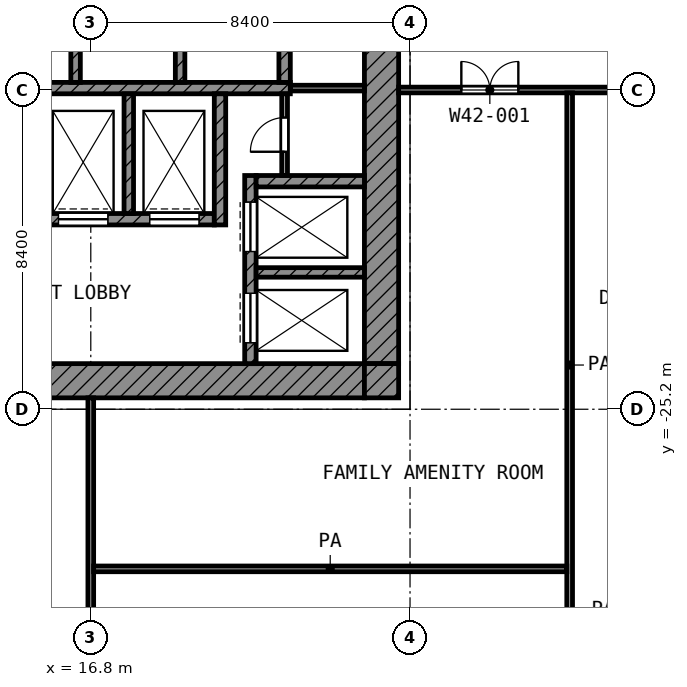
"""IFC4 building model, lengths in metres.
Left out: names, types, materials, properties, quantities, classifications, styles, units other than length and angle.
Written with IfcOpenShell. Run it as: python <this file> out.ifc"""

import sys

from ifc_helpers import new_model, si_unit, direction, frame, frame_2d, origin, place, context, subcontext, project, spatial, rectangle, extrude, element, fill, save


model = new_model("IFC4")
c1 = context("Model", 3, precision=1e-05, world=origin(), true_north=direction((0.0, 1.0)))
c2 = subcontext(c1, "Body", "Model", "MODEL_VIEW")
j1 = project(units=[si_unit("LENGTHUNIT", "METRE"), si_unit("PLANEANGLEUNIT", "RADIAN")], contexts=[c1])
p1 = place(None, origin())
s1 = spatial("IfcSite", under=j1, at=p1, CompositionType="ELEMENT")
p2 = place(p1, origin())
s2 = spatial("IfcBuilding", under=s1, at=p2, CompositionType="ELEMENT")
p3 = place(p2, frame((0.0, 0.0, 183.6)))
s3 = spatial("IfcBuildingStorey", under=s2, at=p3, CompositionType="ELEMENT", Elevation=183.6)
p4 = place(p3, frame((24.45, -24.0, 0.0), z_axis=(0.0, 0.0, 1.0), x_axis=(0.0, 1.0, 0.0)))
e1 = element("IfcWall", 1, at=p4, inside=s3, PredefinedType="SHEAR", context=c2, shape_type="SweptSolid", body=[
    extrude(rectangle(XDim=18.6, YDim=0.9, at=frame_2d((9.3, 0.0))), origin(), (0.0, 0.0, 1.0), 3.6),
])
p5 = place(p4, frame((10.5, 0.0, 0.0)))
e2 = element("IfcOpeningElement", 2, at=p5, cuts=e1, PredefinedType="OPENING", context=c2, shape_type="SweptSolid", body=[
    extrude(rectangle(XDim=1.8, YDim=2.1, at=frame_2d((0.9, 1.05))), frame((0.0, 0.46, 0.0), z_axis=(0.0, -1.0, 0.0), x_axis=(1.0, 0.0, 0.0)), (0.0, 0.0, 1.0), 0.92),
])
p6 = place(p3, frame((5.4, -24.45, 0.0), z_axis=(0.0, 0.0, 1.0), x_axis=(1.0, 0.0, 0.0)))
e3 = element("IfcWall", 3, at=p6, inside=s3, PredefinedType="SHEAR", context=c2, shape_type="SweptSolid", body=[
    extrude(rectangle(XDim=18.6, YDim=0.9, at=frame_2d((9.3, 0.0))), origin(), (0.0, 0.0, 1.0), 3.6),
])
p7 = place(p6, frame((6.3, 0.0, 0.0)))
e4 = element("IfcOpeningElement", 4, at=p7, cuts=e3, PredefinedType="OPENING", context=c2, shape_type="SweptSolid", body=[
    extrude(rectangle(XDim=1.8, YDim=2.1, at=frame_2d((0.9, 1.05))), frame((0.0, 0.46, 0.0), z_axis=(0.0, -1.0, 0.0), x_axis=(1.0, 0.0, 0.0)), (0.0, 0.0, 1.0), 0.92),
])
p8 = place(p3, frame((24.45, -24.9, 0.0), z_axis=(0.0, 0.0, 1.0), x_axis=(0.0, 1.0, 0.0)))
e5 = element("IfcWall", 5, at=p8, inside=s3, PredefinedType="SHEAR", context=c2, shape_type="SweptSolid", body=[
    extrude(rectangle(XDim=0.9, YDim=0.9, at=frame_2d((0.45, 0.0))), origin(), (0.0, 0.0, 1.0), 3.6),
])
p9 = place(p3, frame((5.4, -16.75, 0.0), z_axis=(0.0, 0.0, 1.0), x_axis=(1.0, 0.0, 0.0)))
e6 = element("IfcWall", 6, at=p9, inside=s3, PredefinedType="SHEAR", context=c2, shape_type="SweptSolid", body=[
    extrude(rectangle(XDim=16.65, YDim=0.3, at=frame_2d((8.325, 0.0))), origin(), (0.0, 0.0, 1.0), 3.6),
])
p10 = place(p3, frame((5.4, -20.2, 0.0), z_axis=(0.0, 0.0, 1.0), x_axis=(1.0, 0.0, 0.0)))
e7 = element("IfcWall", 7, at=p10, inside=s3, PredefinedType="SHEAR", context=c2, shape_type="SweptSolid", body=[
    extrude(rectangle(XDim=14.65, YDim=0.3, at=frame_2d((7.325, 0.0))), origin(), (0.0, 0.0, 1.0), 3.6),
])
p11 = place(p10, frame((10.55, 0.0, 0.0)))
e8 = element("IfcOpeningElement", 8, at=p11, cuts=e7, PredefinedType="OPENING", context=c2, shape_type="SweptSolid", body=[
    extrude(rectangle(XDim=1.3, YDim=2.1, at=frame_2d((0.65, 1.05))), frame((0.0, 0.16, 0.0), z_axis=(0.0, -1.0, 0.0), x_axis=(1.0, 0.0, 0.0)), (0.0, 0.0, 1.0), 0.32),
])
p12 = place(p10, frame((12.95, 0.0, 0.0)))
e9 = element("IfcOpeningElement", 9, at=p12, cuts=e7, PredefinedType="OPENING", context=c2, shape_type="SweptSolid", body=[
    extrude(rectangle(XDim=1.3, YDim=2.1, at=frame_2d((0.65, 1.05))), frame((0.0, 0.16, 0.0), z_axis=(0.0, -1.0, 0.0), x_axis=(1.0, 0.0, 0.0)), (0.0, 0.0, 1.0), 0.32),
])
p13 = place(p10, frame((0.55, 0.0, 0.0)))
e10 = element("IfcOpeningElement", 10, at=p13, cuts=e7, PredefinedType="OPENING", context=c2, shape_type="SweptSolid", body=[
    extrude(rectangle(XDim=1.3, YDim=2.1, at=frame_2d((0.65, 1.05))), frame((0.0, 0.16, 0.0), z_axis=(0.0, -1.0, 0.0), x_axis=(1.0, 0.0, 0.0)), (0.0, 0.0, 1.0), 0.32),
])
p14 = place(p10, frame((2.95, 0.0, 0.0)))
e11 = element("IfcOpeningElement", 11, at=p14, cuts=e7, PredefinedType="OPENING", context=c2, shape_type="SweptSolid", body=[
    extrude(rectangle(XDim=1.3, YDim=2.1, at=frame_2d((0.65, 1.05))), frame((0.0, 0.16, 0.0), z_axis=(0.0, -1.0, 0.0), x_axis=(1.0, 0.0, 0.0)), (0.0, 0.0, 1.0), 0.32),
])
p15 = place(p10, frame((7.15, 0.0, 0.0)))
e12 = element("IfcOpeningElement", 12, at=p15, cuts=e7, PredefinedType="OPENING", context=c2, shape_type="SweptSolid", body=[
    extrude(rectangle(XDim=0.9, YDim=2.1, at=frame_2d((0.45, 1.05))), frame((0.0, 0.16, 0.0), z_axis=(0.0, -1.0, 0.0), x_axis=(1.0, 0.0, 0.0)), (0.0, 0.0, 1.0), 0.32),
])
p16 = place(p3, frame((20.2, -20.35, 0.0), z_axis=(0.0, 0.0, 1.0), x_axis=(0.0, 1.0, 0.0)))
e13 = element("IfcWall", 13, at=p16, inside=s3, PredefinedType="SHEAR", context=c2, shape_type="SweptSolid", body=[
    extrude(rectangle(XDim=3.45, YDim=0.3, at=frame_2d((1.725, 0.0))), origin(), (0.0, 0.0, 1.0), 3.6),
])
p17 = place(p3, frame((21.9, -16.6, 0.0), z_axis=(0.0, 0.0, 1.0), x_axis=(0.0, 1.0, 0.0)))
e14 = element("IfcWall", 14, at=p17, inside=s3, PredefinedType="SHEAR", context=c2, shape_type="SweptSolid", body=[
    extrude(rectangle(XDim=2.35, YDim=0.3, at=frame_2d((1.175, 0.0))), origin(), (0.0, 0.0, 1.0), 3.6),
])
p18 = place(p3, frame((21.15, -19.2, 0.0), z_axis=(0.0, 0.0, 1.0), x_axis=(1.0, 0.0, 0.0)))
e15 = element("IfcWall", 15, at=p18, inside=s3, PredefinedType="SHEAR", context=c2, shape_type="SweptSolid", body=[
    extrude(rectangle(XDim=2.85, YDim=0.3, at=frame_2d((1.425, 0.0))), origin(), (0.0, 0.0, 1.0), 3.6),
])
p19 = place(p3, frame((21.0, -24.0, 0.0), z_axis=(0.0, 0.0, 1.0), x_axis=(0.0, 1.0, 0.0)))
e16 = element("IfcWall", 16, at=p19, inside=s3, PredefinedType="SHEAR", context=c2, shape_type="SweptSolid", body=[
    extrude(rectangle(XDim=4.95, YDim=0.3, at=frame_2d((2.475, 0.0))), origin(), (0.0, 0.0, 1.0), 3.6),
])
p20 = place(p19, frame((2.95, 0.0, 0.0)))
e17 = element("IfcOpeningElement", 17, at=p20, cuts=e16, PredefinedType="OPENING", context=c2, shape_type="SweptSolid", body=[
    extrude(rectangle(XDim=1.3, YDim=2.1, at=frame_2d((0.65, 1.05))), frame((0.0, 0.16, 0.0), z_axis=(0.0, -1.0, 0.0), x_axis=(1.0, 0.0, 0.0)), (0.0, 0.0, 1.0), 0.32),
])
p21 = place(p19, frame((0.55, 0.0, 0.0)))
e18 = element("IfcOpeningElement", 18, at=p21, cuts=e16, PredefinedType="OPENING", context=c2, shape_type="SweptSolid", body=[
    extrude(rectangle(XDim=1.3, YDim=2.1, at=frame_2d((0.65, 1.05))), frame((0.0, 0.16, 0.0), z_axis=(0.0, -1.0, 0.0), x_axis=(1.0, 0.0, 0.0)), (0.0, 0.0, 1.0), 0.32),
])
p22 = place(p3, frame((21.15, -21.6, 0.0), z_axis=(0.0, 0.0, 1.0), x_axis=(1.0, 0.0, 0.0)))
e19 = element("IfcWall", 19, at=p22, inside=s3, PredefinedType="SHEAR", context=c2, shape_type="SweptSolid", body=[
    extrude(rectangle(XDim=2.85, YDim=0.25, at=frame_2d((1.425, 0.0))), origin(), (0.0, 0.0, 1.0), 3.6),
])
p23 = place(p3, frame((17.8, -20.05, 0.0), z_axis=(0.0, 0.0, 1.0), x_axis=(0.0, 1.0, 0.0)))
e20 = element("IfcWall", 20, at=p23, inside=s3, PredefinedType="SHEAR", context=c2, shape_type="SweptSolid", body=[
    extrude(rectangle(XDim=3.15, YDim=0.25, at=frame_2d((1.575, 0.0))), origin(), (0.0, 0.0, 1.0), 3.6),
])
for number, where, z_axis, x_axis in (
    (21, (16.4, -16.6, 0.0), (0.0, 0.0, 1.0), (0.0, 1.0, 0.0)),
    (22, (19.15, -16.6, 0.0), (0.0, 0.0, 1.0), (0.0, 1.0, 0.0)),
):
    element("IfcWall", number, at=place(p3, frame(where, z_axis=z_axis, x_axis=x_axis)), inside=s3, PredefinedType="SHEAR", context=c2, shape_type="SweptSolid", body=[
        extrude(rectangle(XDim=2.35, YDim=0.25, at=frame_2d((1.175, 0.0))), origin(), (0.0, 0.0, 1.0), 3.6),
    ])
p24 = place(p3, frame((21.9, -19.05, 0.0), z_axis=(0.0, 0.0, 1.0), x_axis=(0.0, 1.0, 0.0)))
e23 = element("IfcWall", 23, at=p24, inside=s3, PredefinedType="PARTITIONING", context=c2, shape_type="SweptSolid", body=[
    extrude(rectangle(XDim=2.15, YDim=0.15, at=frame_2d((1.075, 0.0))), origin(), (0.0, 0.0, 1.0), 3.6),
])
p25 = place(p24, frame((0.625, 0.0, 0.0)))
e24 = element("IfcOpeningElement", 24, at=p25, cuts=e23, PredefinedType="OPENING", context=c2, shape_type="SweptSolid", body=[
    extrude(rectangle(XDim=0.9, YDim=2.1, at=frame_2d((0.45, 1.05))), frame((0.0, 0.085, 0.0), z_axis=(0.0, -1.0, 0.0), x_axis=(1.0, 0.0, 0.0)), (0.0, 0.0, 1.0), 0.17),
])
p26 = place(p3, frame((22.05, -16.75, 0.0), z_axis=(0.0, 0.0, 1.0), x_axis=(1.0, 0.0, 0.0)))
e25 = element("IfcWall", 25, at=p26, inside=s3, PredefinedType="PARTITIONING", context=c2, shape_type="SweptSolid", body=[
    extrude(rectangle(XDim=1.95, YDim=0.15, at=frame_2d((0.975, 0.0))), origin(), (0.0, 0.0, 1.0), 3.6),
])
p27 = place(p3, frame((16.875, -29.4, 0.0), z_axis=(0.0, 0.0, 1.0), x_axis=(1.0, 0.0, 0.0)))
e26 = element("IfcWall", 26, at=p27, inside=s3, PredefinedType="PARTITIONING", context=c2, shape_type="SweptSolid", body=[
    extrude(rectangle(XDim=12.45, YDim=0.15, at=frame_2d((6.225, 0.0))), origin(), (0.0, 0.0, 1.0), 3.6),
])
p28 = place(p3, frame((24.9, -16.8, 0.0), z_axis=(0.0, 0.0, 1.0), x_axis=(1.0, 0.0, 0.0)))
e27 = element("IfcWall", 27, at=p28, inside=s3, PredefinedType="PARTITIONING", context=c2, shape_type="SweptSolid", body=[
    extrude(rectangle(XDim=42.22, YDim=0.15, at=frame_2d((21.11, 0.0))), origin(), (0.0, 0.0, 1.0), 3.6),
])
p29 = place(p28, frame((1.65, 0.0, 0.0)))
e28 = element("IfcOpeningElement", 28, at=p29, cuts=e27, PredefinedType="OPENING", context=c2, shape_type="SweptSolid", body=[
    extrude(rectangle(XDim=1.5, YDim=2.1, at=frame_2d((0.75, 1.05))), frame((0.0, 0.085, 0.0), z_axis=(0.0, -1.0, 0.0), x_axis=(1.0, 0.0, 0.0)), (0.0, 0.0, 1.0), 0.17),
])
p30 = place(p28, frame((6.1, 0.0, 0.0)))
e29 = element("IfcOpeningElement", 29, at=p30, cuts=e27, PredefinedType="OPENING", context=c2, shape_type="SweptSolid", body=[
    extrude(rectangle(XDim=1.0, YDim=2.1, at=frame_2d((0.5, 1.05))), frame((0.0, 0.085, 0.0), z_axis=(0.0, -1.0, 0.0), x_axis=(1.0, 0.0, 0.0)), (0.0, 0.0, 1.0), 0.17),
])
p31 = place(p28, frame((10.2, 0.0, 0.0)))
e30 = element("IfcOpeningElement", 30, at=p31, cuts=e27, PredefinedType="OPENING", context=c2, shape_type="SweptSolid", body=[
    extrude(rectangle(XDim=1.2, YDim=2.1, at=frame_2d((0.6, 1.05))), frame((0.0, 0.085, 0.0), z_axis=(0.0, -1.0, 0.0), x_axis=(1.0, 0.0, 0.0)), (0.0, 0.0, 1.0), 0.17),
])
p32 = place(p28, frame((20.34, 0.0, 0.0)))
e31 = element("IfcOpeningElement", 31, at=p32, cuts=e27, PredefinedType="OPENING", context=c2, shape_type="SweptSolid", body=[
    extrude(rectangle(XDim=1.2, YDim=2.1, at=frame_2d((0.6, 1.05))), frame((0.0, 0.085, 0.0), z_axis=(0.0, -1.0, 0.0), x_axis=(1.0, 0.0, 0.0)), (0.0, 0.0, 1.0), 0.17),
])
p33 = place(p28, frame((18.78, 0.0, 0.0)))
e32 = element("IfcOpeningElement", 32, at=p33, cuts=e27, PredefinedType="OPENING", context=c2, shape_type="SweptSolid", body=[
    extrude(rectangle(XDim=1.2, YDim=2.1, at=frame_2d((0.6, 1.05))), frame((0.0, 0.085, 0.0), z_axis=(0.0, -1.0, 0.0), x_axis=(1.0, 0.0, 0.0)), (0.0, 0.0, 1.0), 0.17),
])
p34 = place(p28, frame((28.0, 0.0, 0.0)))
e33 = element("IfcOpeningElement", 33, at=p34, cuts=e27, PredefinedType="OPENING", context=c2, shape_type="SweptSolid", body=[
    extrude(rectangle(XDim=1.2, YDim=2.1, at=frame_2d((0.6, 1.05))), frame((0.0, 0.085, 0.0), z_axis=(0.0, -1.0, 0.0), x_axis=(1.0, 0.0, 0.0)), (0.0, 0.0, 1.0), 0.17),
])
p35 = place(p28, frame((26.48, 0.0, 0.0)))
e34 = element("IfcOpeningElement", 34, at=p35, cuts=e27, PredefinedType="OPENING", context=c2, shape_type="SweptSolid", body=[
    extrude(rectangle(XDim=1.2, YDim=2.1, at=frame_2d((0.6, 1.05))), frame((0.0, 0.085, 0.0), z_axis=(0.0, -1.0, 0.0), x_axis=(1.0, 0.0, 0.0)), (0.0, 0.0, 1.0), 0.17),
])
p36 = place(p28, frame((32.1, 0.0, 0.0)))
e35 = element("IfcOpeningElement", 35, at=p36, cuts=e27, PredefinedType="OPENING", context=c2, shape_type="SweptSolid", body=[
    extrude(rectangle(XDim=1.2, YDim=2.1, at=frame_2d((0.6, 1.05))), frame((0.0, 0.085, 0.0), z_axis=(0.0, -1.0, 0.0), x_axis=(1.0, 0.0, 0.0)), (0.0, 0.0, 1.0), 0.17),
])
p37 = place(p28, frame((37.35, 0.0, 0.0)))
e36 = element("IfcOpeningElement", 36, at=p37, cuts=e27, PredefinedType="OPENING", context=c2, shape_type="SweptSolid", body=[
    extrude(rectangle(XDim=1.5, YDim=2.1, at=frame_2d((0.75, 1.05))), frame((0.0, 0.085, 0.0), z_axis=(0.0, -1.0, 0.0), x_axis=(1.0, 0.0, 0.0)), (0.0, 0.0, 1.0), 0.17),
])
p38 = place(p3, frame((16.8, -54.52, 0.0), z_axis=(0.0, 0.0, 1.0), x_axis=(0.0, 1.0, 0.0)))
e37 = element("IfcWall", 37, at=p38, inside=s3, PredefinedType="PARTITIONING", context=c2, shape_type="SweptSolid", body=[
    extrude(rectangle(XDim=29.62, YDim=0.15, at=frame_2d((14.81, 0.0))), origin(), (0.0, 0.0, 1.0), 3.6),
])
p39 = place(p38, frame((21.52, 0.0, 0.0)))
e38 = element("IfcOpeningElement", 38, at=p39, cuts=e37, PredefinedType="OPENING", context=c2, shape_type="SweptSolid", body=[
    extrude(rectangle(XDim=1.2, YDim=2.1, at=frame_2d((0.6, 1.05))), frame((0.0, 0.085, 0.0), z_axis=(0.0, -1.0, 0.0), x_axis=(1.0, 0.0, 0.0)), (0.0, 0.0, 1.0), 0.17),
])
p40 = place(p38, frame((10.76, 0.0, 0.0)))
e39 = element("IfcOpeningElement", 39, at=p40, cuts=e37, PredefinedType="OPENING", context=c2, shape_type="SweptSolid", body=[
    extrude(rectangle(XDim=1.2, YDim=2.1, at=frame_2d((0.6, 1.05))), frame((0.0, 0.085, 0.0), z_axis=(0.0, -1.0, 0.0), x_axis=(1.0, 0.0, 0.0)), (0.0, 0.0, 1.0), 0.17),
])
p41 = place(p38, frame((9.2, 0.0, 0.0)))
e40 = element("IfcOpeningElement", 40, at=p41, cuts=e37, PredefinedType="OPENING", context=c2, shape_type="SweptSolid", body=[
    extrude(rectangle(XDim=1.2, YDim=2.1, at=frame_2d((0.6, 1.05))), frame((0.0, 0.085, 0.0), z_axis=(0.0, -1.0, 0.0), x_axis=(1.0, 0.0, 0.0)), (0.0, 0.0, 1.0), 0.17),
])
p42 = place(p38, frame((7.99, 0.0, 0.0)))
e41 = element("IfcOpeningElement", 41, at=p42, cuts=e37, PredefinedType="OPENING", context=c2, shape_type="SweptSolid", body=[
    extrude(rectangle(XDim=0.9, YDim=2.1, at=frame_2d((0.45, 1.05))), frame((0.0, 0.085, 0.0), z_axis=(0.0, -1.0, 0.0), x_axis=(1.0, 0.0, 0.0)), (0.0, 0.0, 1.0), 0.17),
])
p43 = place(p38, frame((2.07, 0.0, 0.0)))
e42 = element("IfcOpeningElement", 42, at=p43, cuts=e37, PredefinedType="OPENING", context=c2, shape_type="SweptSolid", body=[
    extrude(rectangle(XDim=1.5, YDim=2.1, at=frame_2d((0.75, 1.05))), frame((0.0, 0.085, 0.0), z_axis=(0.0, -1.0, 0.0), x_axis=(1.0, 0.0, 0.0)), (0.0, 0.0, 1.0), 0.17),
])
p44 = place(p3, frame((29.4, -31.198, 0.0), z_axis=(0.0, 0.0, 1.0), x_axis=(0.0, 1.0, 0.0)))
e43 = element("IfcWall", 43, at=p44, inside=s3, PredefinedType="PARTITIONING", context=c2, shape_type="SweptSolid", body=[
    extrude(rectangle(XDim=14.323, YDim=0.15, at=frame_2d((7.162, 0.0))), origin(), (0.0, 0.0, 1.0), 3.6),
])
p45 = place(p20, origin())
e44 = element("IfcDoor", 44, at=p45, inside=s3, OperationType="DOUBLE_DOOR_SLIDING", PredefinedType="DOOR", context=c2, shape_type="SweptSolid", body=[
    extrude(rectangle(XDim=1.3, YDim=2.1, at=frame_2d((0.65, 1.05))), frame((0.0, 0.025, 0.0), z_axis=(0.0, -1.0, 0.0), x_axis=(1.0, 0.0, 0.0)), (0.0, 0.0, 1.0), 0.05),
])
fill(e17, e44)
p46 = place(p21, origin())
e45 = element("IfcDoor", 45, at=p46, inside=s3, OperationType="DOUBLE_DOOR_SLIDING", PredefinedType="DOOR", context=c2, shape_type="SweptSolid", body=[
    extrude(rectangle(XDim=1.3, YDim=2.1, at=frame_2d((0.65, 1.05))), frame((0.0, 0.025, 0.0), z_axis=(0.0, -1.0, 0.0), x_axis=(1.0, 0.0, 0.0)), (0.0, 0.0, 1.0), 0.05),
])
fill(e18, e45)
p47 = place(p11, origin())
e46 = element("IfcDoor", 46, at=p47, inside=s3, OperationType="DOUBLE_DOOR_SLIDING", PredefinedType="DOOR", context=c2, shape_type="SweptSolid", body=[
    extrude(rectangle(XDim=1.3, YDim=2.1, at=frame_2d((0.65, 1.05))), frame((0.0, 0.025, 0.0), z_axis=(0.0, -1.0, 0.0), x_axis=(1.0, 0.0, 0.0)), (0.0, 0.0, 1.0), 0.05),
])
fill(e8, e46)
p48 = place(p12, origin())
e47 = element("IfcDoor", 47, at=p48, inside=s3, OperationType="DOUBLE_DOOR_SLIDING", PredefinedType="DOOR", context=c2, shape_type="SweptSolid", body=[
    extrude(rectangle(XDim=1.3, YDim=2.1, at=frame_2d((0.65, 1.05))), frame((0.0, 0.025, 0.0), z_axis=(0.0, -1.0, 0.0), x_axis=(1.0, 0.0, 0.0)), (0.0, 0.0, 1.0), 0.05),
])
fill(e9, e47)
p49 = place(p25, origin())
e48 = element("IfcDoor", 48, at=p49, inside=s3, OperationType="SINGLE_SWING_LEFT", PredefinedType="DOOR", context=c2, shape_type="SweptSolid", body=[
    extrude(rectangle(XDim=0.9, YDim=2.1, at=frame_2d((0.45, 1.05))), frame((0.0, 0.025, 0.0), z_axis=(0.0, -1.0, 0.0), x_axis=(1.0, 0.0, 0.0)), (0.0, 0.0, 1.0), 0.05),
])
fill(e24, e48)
p50 = place(p29, origin())
e49 = element("IfcDoor", 49, at=p50, inside=s3, OperationType="DOUBLE_DOOR_SINGLE_SWING", PredefinedType="DOOR", context=c2, shape_type="SweptSolid", body=[
    extrude(rectangle(XDim=1.5, YDim=2.1, at=frame_2d((0.75, 1.05))), frame((0.0, 0.025, 0.0), z_axis=(0.0, -1.0, 0.0), x_axis=(1.0, 0.0, 0.0)), (0.0, 0.0, 1.0), 0.05),
])
fill(e28, e49)
save(model, sys.argv[1])
